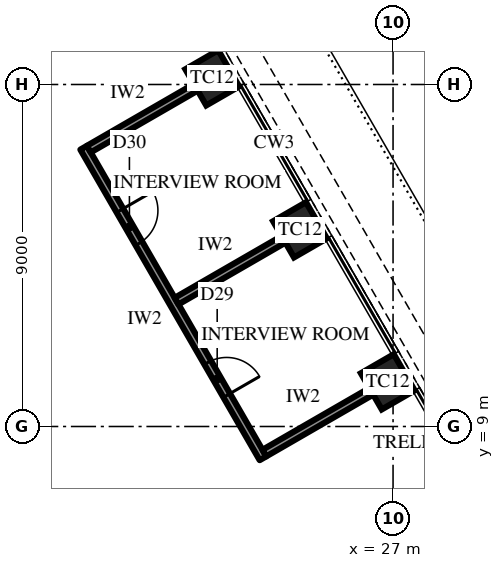
"""IFC4 building model, lengths in metres.
Left out: names, types, materials, properties, quantities, classifications, styles, units other than length and angle.
Written with IfcOpenShell. Run it as: python <this file> out.ifc"""

import sys

from ifc_helpers import new_model, si_unit, direction, frame, frame_2d, origin, origin_2d, place, context, subcontext, project, spatial, rectangle, extrude, element, fill, save


model = new_model("IFC4")
c1 = context("Model", 3, precision=1e-05, world=origin(), true_north=direction((0.0, 1.0)))
c2 = subcontext(c1, "Body", "Model", "MODEL_VIEW")
j1 = project(units=[si_unit("LENGTHUNIT", "METRE"), si_unit("PLANEANGLEUNIT", "RADIAN")], contexts=[c1])
p1 = place(None, origin())
s1 = spatial("IfcSite", under=j1, at=p1, CompositionType="ELEMENT")
p2 = place(p1, origin())
s2 = spatial("IfcBuilding", under=s1, at=p2, CompositionType="ELEMENT")
p3 = place(p2, frame((0.0, 0.0, 278.5)))
s3 = spatial("IfcBuildingStorey", under=s2, at=p3, CompositionType="ELEMENT", Elevation=278.5)
for number, where, z_axis, x_axis in (
    (1, (26.861, 10.175, 0.0), (0.0, 0.0, 1.0), (-0.5, 0.866, 0.0)),
    (2, (24.552, 14.175, 0.0), (0.0, 0.0, 1.0), (-0.5, 0.866, 0.0)),
    (3, (22.242, 18.175, 0.0), (0.0, 0.0, 1.0), (-0.5, 0.866, 0.0)),
):
    element("IfcColumn", number, at=place(p3, frame(where, z_axis=z_axis, x_axis=x_axis)), inside=s3, PredefinedType="COLUMN", context=c2, shape_type="SweptSolid", body=[
        extrude(rectangle(XDim=1.1, YDim=1.0, at=origin_2d()), origin(), (0.0, 0.0, 1.0), 4.2),
    ])
p4 = place(p3, frame((23.577, 8.163, 0.0), z_axis=(0.0, 0.0, 1.0), x_axis=(-0.499989672313, 0.866031366395, 0.0)))
e4 = element("IfcWall", 4, at=p4, inside=s3, PredefinedType="PARTITIONING", context=c2, shape_type="SweptSolid", body=[
    extrude(rectangle(XDim=9.438, YDim=0.2, at=frame_2d((4.719, 0.0))), origin(), (0.0, 0.0, 1.0), 4.0),
])
p5 = place(p4, frame((1.909, 0.0, 0.0)))
e5 = element("IfcOpeningElement", 5, at=p5, cuts=e4, PredefinedType="OPENING", context=c2, shape_type="SweptSolid", body=[
    extrude(rectangle(XDim=1.0, YDim=2.2, at=frame_2d((0.5, 1.1))), frame((0.0, 0.11, 0.0), z_axis=(0.0, -1.0, 0.0), x_axis=(1.0, 0.0, 0.0)), (0.0, 0.0, 1.0), 0.22),
])
p6 = place(p4, frame((6.528, 0.0, 0.0)))
e6 = element("IfcOpeningElement", 6, at=p6, cuts=e4, PredefinedType="OPENING", context=c2, shape_type="SweptSolid", body=[
    extrude(rectangle(XDim=1.0, YDim=2.2, at=frame_2d((0.5, 1.1))), frame((0.0, 0.11, 0.0), z_axis=(0.0, -1.0, 0.0), x_axis=(1.0, 0.0, 0.0)), (0.0, 0.0, 1.0), 0.22),
])
for number, where, z_axis, x_axis in (
    (7, (23.614, 8.3, 0.0), (0.0, 0.0, 1.0), (0.866, 0.5, 0.0)),
    (8, (21.304, 12.3, 0.0), (0.0, 0.0, 1.0), (0.866, 0.5, 0.0)),
    (9, (18.995, 16.3, 0.0), (0.0, 0.0, 1.0), (0.866, 0.5, 0.0)),
):
    element("IfcWall", number, at=place(p3, frame(where, z_axis=z_axis, x_axis=x_axis)), inside=s3, PredefinedType="PARTITIONING", context=c2, shape_type="SweptSolid", body=[
        extrude(rectangle(XDim=3.25, YDim=0.2, at=frame_2d((1.625, 0.0))), origin(), (0.0, 0.0, 1.0), 3.082),
    ])
p7 = place(p5, frame((1.0, 0.0, 0.0), z_axis=(0.0, 0.0, 1.0), x_axis=(-1.0, 0.0, 0.0)))
e10 = element("IfcDoor", 10, at=p7, inside=s3, OperationType="SINGLE_SWING_LEFT", PredefinedType="DOOR", context=c2, shape_type="SweptSolid", body=[
    extrude(rectangle(XDim=1.0, YDim=2.2, at=frame_2d((0.5, 1.1))), frame((0.0, 0.025, 0.0), z_axis=(0.0, -1.0, 0.0), x_axis=(1.0, 0.0, 0.0)), (0.0, 0.0, 1.0), 0.05),
])
fill(e5, e10)
p8 = place(p6, frame((1.0, 0.0, 0.0), z_axis=(0.0, 0.0, 1.0), x_axis=(-1.0, 0.0, 0.0)))
e11 = element("IfcDoor", 11, at=p8, inside=s3, OperationType="SINGLE_SWING_RIGHT", PredefinedType="DOOR", context=c2, shape_type="SweptSolid", body=[
    extrude(rectangle(XDim=1.0, YDim=2.2, at=frame_2d((0.5, 1.1))), frame((0.0, 0.025, 0.0), z_axis=(0.0, -1.0, 0.0), x_axis=(1.0, 0.0, 0.0)), (0.0, 0.0, 1.0), 0.05),
])
fill(e6, e11)
save(model, sys.argv[1])
